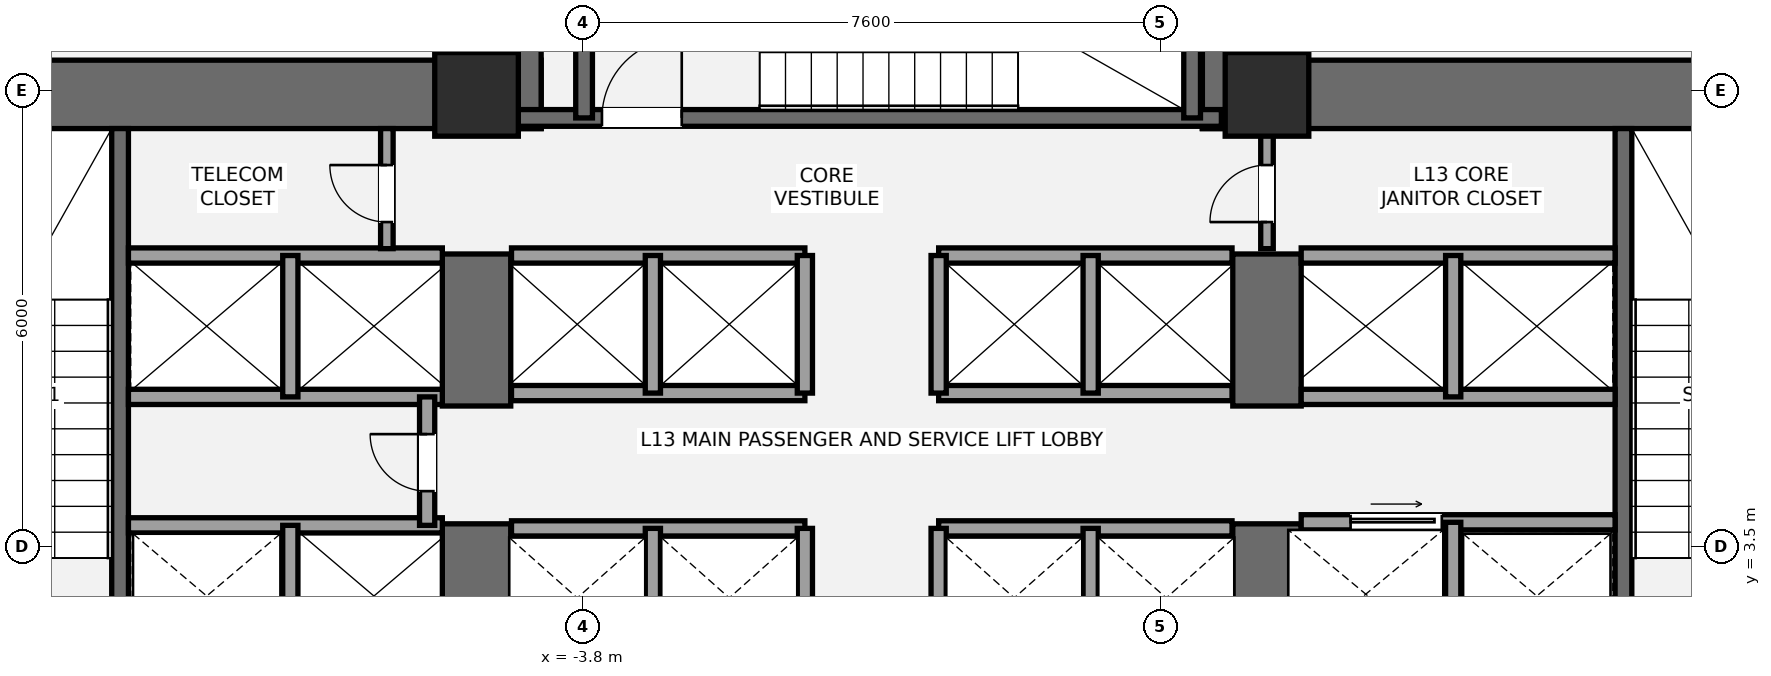
"""IFC4 building model, lengths in metres.
Left out: names, types, materials, properties, quantities, classifications, styles, units other than length and angle.
Written with IfcOpenShell. Run it as: python <this file> out.ifc"""

import sys

from ifc_helpers import new_model, si_unit, direction, frame, frame_2d, origin, origin_2d, place, context, subcontext, project, spatial, rectangle, extrude, element, fill, save


model = new_model("IFC4")
c1 = context("Model", 3, precision=1e-05, world=origin(), true_north=direction((0.0, 1.0)))
c2 = subcontext(c1, "Body", "Model", "MODEL_VIEW")
j1 = project(units=[si_unit("LENGTHUNIT", "METRE"), si_unit("PLANEANGLEUNIT", "RADIAN")], contexts=[c1])
p1 = place(None, origin())
s1 = spatial("IfcSite", under=j1, at=p1, CompositionType="ELEMENT")
p2 = place(p1, origin())
s2 = spatial("IfcBuilding", under=s1, at=p2, CompositionType="ELEMENT")
p3 = place(p2, frame((0.0, 0.0, 52.2)))
s3 = spatial("IfcBuildingStorey", under=s2, at=p3, CompositionType="ELEMENT", Elevation=52.2)
p4 = place(p3, frame((-14.05, 9.45, 0.0), z_axis=(0.0, 0.0, 1.0), x_axis=(1.0, 0.0, 0.0)))
e1 = element("IfcWall", 1, at=p4, inside=s3, PredefinedType="SHEAR", context=c2, shape_type="SweptSolid", body=[
    extrude(rectangle(XDim=9.7, YDim=0.9, at=frame_2d((4.85, 0.0))), origin(), (0.0, 0.0, 1.0), 3.6),
])
p5 = place(p3, frame((-5.2, 0.95, 0.0), z_axis=(0.0, 0.0, 1.0), x_axis=(0.0, 1.0, 0.0)))
e2 = element("IfcWall", 2, at=p5, inside=s3, PredefinedType="SHEAR", context=c2, shape_type="SweptSolid", body=[
    extrude(rectangle(XDim=2.85, YDim=0.9, at=frame_2d((1.425, 0.0))), origin(), (0.0, 0.0, 1.0), 3.6),
])
p6 = place(p3, frame((-5.2, 5.35, 0.0), z_axis=(0.0, 0.0, 1.0), x_axis=(0.0, 1.0, 0.0)))
e3 = element("IfcWall", 3, at=p6, inside=s3, PredefinedType="SHEAR", context=c2, shape_type="SweptSolid", body=[
    extrude(rectangle(XDim=2.0, YDim=0.9, at=frame_2d((1.0, 0.0))), origin(), (0.0, 0.0, 1.0), 3.6),
])
p7 = place(p3, frame((-9.89, 1.85, 0.0), z_axis=(0.0, 0.0, 1.0), x_axis=(0.0, 1.0, 0.0)))
e4 = element("IfcWall", 4, at=p7, inside=s3, PredefinedType="SHEAR", context=c2, shape_type="SweptSolid", body=[
    extrude(rectangle(XDim=7.15, YDim=0.22, at=frame_2d((3.575, 0.0))), origin(), (0.0, 0.0, 1.0), 3.6),
])
p8 = place(p3, frame((4.35, 9.45, 0.0), z_axis=(0.0, 0.0, 1.0), x_axis=(1.0, 0.0, 0.0)))
e5 = element("IfcWall", 5, at=p8, inside=s3, PredefinedType="SHEAR", context=c2, shape_type="SweptSolid", body=[
    extrude(rectangle(XDim=9.7, YDim=0.9, at=frame_2d((4.85, 0.0))), origin(), (0.0, 0.0, 1.0), 3.6),
])
p9 = place(p3, frame((5.2, 0.95, 0.0), z_axis=(0.0, 0.0, 1.0), x_axis=(0.0, 1.0, 0.0)))
e6 = element("IfcWall", 6, at=p9, inside=s3, PredefinedType="SHEAR", context=c2, shape_type="SweptSolid", body=[
    extrude(rectangle(XDim=2.85, YDim=0.9, at=frame_2d((1.425, 0.0))), origin(), (0.0, 0.0, 1.0), 3.6),
])
p10 = place(p3, frame((5.2, 5.35, 0.0), z_axis=(0.0, 0.0, 1.0), x_axis=(0.0, 1.0, 0.0)))
e7 = element("IfcWall", 7, at=p10, inside=s3, PredefinedType="SHEAR", context=c2, shape_type="SweptSolid", body=[
    extrude(rectangle(XDim=2.0, YDim=0.9, at=frame_2d((1.0, 0.0))), origin(), (0.0, 0.0, 1.0), 3.6),
])
p11 = place(p3, frame((9.89, 1.85, 0.0), z_axis=(0.0, 0.0, 1.0), x_axis=(0.0, 1.0, 0.0)))
e8 = element("IfcWall", 8, at=p11, inside=s3, PredefinedType="SHEAR", context=c2, shape_type="SweptSolid", body=[
    extrude(rectangle(XDim=7.15, YDim=0.22, at=frame_2d((3.575, 0.0))), origin(), (0.0, 0.0, 1.0), 3.6),
])
for number, where, z_axis, x_axis in (
    (9, (-4.8, 9.0, 0.0), (0.0, 0.0, 1.0), (0.0, 1.0, 0.0)),
    (10, (4.8, 9.0, 0.0), (0.0, 0.0, 1.0), (0.0, 1.0, 0.0)),
):
    element("IfcWall", number, at=place(p3, frame(where, z_axis=z_axis, x_axis=x_axis)), inside=s3, PredefinedType="SHEAR", context=c2, shape_type="SweptSolid", body=[
        extrude(rectangle(XDim=4.3, YDim=0.9, at=frame_2d((2.15, 0.0))), origin(), (0.0, 0.0, 1.0), 3.6),
    ])
p12 = place(p3, frame((-4.7, 9.14, 0.0), z_axis=(0.0, 0.0, 1.0), x_axis=(1.0, 0.0, 0.0)))
e11 = element("IfcWall", 11, at=p12, inside=s3, PredefinedType="SHEAR", context=c2, shape_type="SweptSolid", body=[
    extrude(rectangle(XDim=9.3, YDim=0.22, at=frame_2d((4.65, 0.0))), origin(), (0.0, 0.0, 1.0), 3.6),
])
p13 = place(p12, frame((1.15, 0.0, 0.0)))
e12 = element("IfcOpeningElement", 12, at=p13, cuts=e11, PredefinedType="OPENING", context=c2, shape_type="SweptSolid", body=[
    extrude(rectangle(XDim=1.05, YDim=2.15, at=frame_2d((0.525, 1.075))), frame((0.0, 0.12, 0.0), z_axis=(0.0, -1.0, 0.0), x_axis=(1.0, 0.0, 0.0)), (0.0, 0.0, 1.0), 0.24),
])
for number, where, z_axis, x_axis in (
    (13, (-3.785, 9.14, 0.0), (0.0, 0.0, 1.0), (0.0, 1.0, 0.0)),
    (14, (4.215, 9.14, 0.0), (0.0, 0.0, 1.0), (0.0, 1.0, 0.0)),
):
    element("IfcWall", number, at=place(p3, frame(where, z_axis=z_axis, x_axis=x_axis)), inside=s3, PredefinedType="SHEAR", context=c2, shape_type="SweptSolid", body=[
        extrude(rectangle(XDim=3.26, YDim=0.22, at=frame_2d((1.63, 0.0))), origin(), (0.0, 0.0, 1.0), 3.6),
    ])
for number, where, z_axis, x_axis in (
    (15, (-5.2, 9.45, 0.0), (0.0, 0.0, 1.0), (1.0, 0.0, 0.0)),
    (16, (5.2, 9.45, 0.0), (0.0, 0.0, 1.0), (1.0, 0.0, 0.0)),
):
    element("IfcColumn", number, at=place(p3, frame(where, z_axis=z_axis, x_axis=x_axis)), inside=s3, PredefinedType="COLUMN", context=c2, shape_type="SweptSolid", body=[
        extrude(rectangle(XDim=1.1, YDim=1.1, at=origin_2d()), origin(), (0.0, 0.0, 1.0), 3.6),
    ])
p14 = place(p3, frame((-9.78, 3.78, 0.0), z_axis=(0.0, 0.0, 1.0), x_axis=(1.0, 0.0, 0.0)))
e17 = element("IfcWall", 17, at=p14, inside=s3, PredefinedType="SOLIDWALL", context=c2, shape_type="SweptSolid", body=[
    extrude(rectangle(XDim=4.13, YDim=0.2, at=frame_2d((2.065, 0.0))), origin(), (0.0, 0.0, 1.0), 3.4),
])
p15 = place(p3, frame((-7.65, 1.85, 0.0), z_axis=(0.0, 0.0, 1.0), x_axis=(0.0, 1.0, 0.0)))
e18 = element("IfcWall", 18, at=p15, inside=s3, PredefinedType="SOLIDWALL", context=c2, shape_type="SweptSolid", body=[
    extrude(rectangle(XDim=1.93, YDim=0.2, at=frame_2d((0.965, 0.0))), origin(), (0.0, 0.0, 1.0), 3.4),
])
for number, where, z_axis, x_axis in (
    (19, (-9.78, 5.47, 0.0), (0.0, 0.0, 1.0), (1.0, 0.0, 0.0)),
    (20, (-9.78, 7.33, 0.0), (0.0, 0.0, 1.0), (1.0, 0.0, 0.0)),
):
    element("IfcWall", number, at=place(p3, frame(where, z_axis=z_axis, x_axis=x_axis)), inside=s3, PredefinedType="SOLIDWALL", context=c2, shape_type="SweptSolid", body=[
        extrude(rectangle(XDim=4.13, YDim=0.2, at=frame_2d((2.065, 0.0))), origin(), (0.0, 0.0, 1.0), 3.4),
    ])
p16 = place(p3, frame((-7.65, 5.47, 0.0), z_axis=(0.0, 0.0, 1.0), x_axis=(0.0, 1.0, 0.0)))
e21 = element("IfcWall", 21, at=p16, inside=s3, PredefinedType="SOLIDWALL", context=c2, shape_type="SweptSolid", body=[
    extrude(rectangle(XDim=1.86, YDim=0.2, at=frame_2d((0.93, 0.0))), origin(), (0.0, 0.0, 1.0), 3.4),
])
p17 = place(p3, frame((-5.85, 3.78, 0.0), z_axis=(0.0, 0.0, 1.0), x_axis=(0.0, 1.0, 0.0)))
e22 = element("IfcWall", 22, at=p17, inside=s3, PredefinedType="SOLIDWALL", context=c2, shape_type="SweptSolid", body=[
    extrude(rectangle(XDim=1.69, YDim=0.2, at=frame_2d((0.845, 0.0))), origin(), (0.0, 0.0, 1.0), 3.4),
])
p18 = place(p17, frame((0.45, 0.0, 0.0)))
e23 = element("IfcOpeningElement", 23, at=p18, cuts=e22, PredefinedType="OPENING", context=c2, shape_type="SweptSolid", body=[
    extrude(rectangle(XDim=0.75, YDim=2.1, at=frame_2d((0.375, 1.05))), frame((0.0, 0.11, 0.0), z_axis=(0.0, -1.0, 0.0), x_axis=(1.0, 0.0, 0.0)), (0.0, 0.0, 1.0), 0.22),
])
p19 = place(p3, frame((5.65, 3.82, 0.0), z_axis=(0.0, 0.0, 1.0), x_axis=(1.0, 0.0, 0.0)))
e24 = element("IfcWall", 24, at=p19, inside=s3, PredefinedType="SOLIDWALL", context=c2, shape_type="SweptSolid", body=[
    extrude(rectangle(XDim=4.13, YDim=0.2, at=frame_2d((2.065, 0.0))), origin(), (0.0, 0.0, 1.0), 3.4),
])
p20 = place(p19, frame((0.65, 0.0, 0.0)))
e25 = element("IfcOpeningElement", 25, at=p20, cuts=e24, PredefinedType="OPENING", context=c2, shape_type="SweptSolid", body=[
    extrude(rectangle(XDim=1.2, YDim=2.2, at=frame_2d((0.6, 1.1))), frame((0.0, 0.11, 0.0), z_axis=(0.0, -1.0, 0.0), x_axis=(1.0, 0.0, 0.0)), (0.0, 0.0, 1.0), 0.22),
])
p21 = place(p3, frame((7.65, 1.85, 0.0), z_axis=(0.0, 0.0, 1.0), x_axis=(0.0, 1.0, 0.0)))
e26 = element("IfcWall", 26, at=p21, inside=s3, PredefinedType="SOLIDWALL", context=c2, shape_type="SweptSolid", body=[
    extrude(rectangle(XDim=1.97, YDim=0.2, at=frame_2d((0.985, 0.0))), origin(), (0.0, 0.0, 1.0), 3.4),
])
for number, where, z_axis, x_axis in (
    (27, (5.65, 5.47, 0.0), (0.0, 0.0, 1.0), (1.0, 0.0, 0.0)),
    (28, (5.65, 7.33, 0.0), (0.0, 0.0, 1.0), (1.0, 0.0, 0.0)),
):
    element("IfcWall", number, at=place(p3, frame(where, z_axis=z_axis, x_axis=x_axis)), inside=s3, PredefinedType="SOLIDWALL", context=c2, shape_type="SweptSolid", body=[
        extrude(rectangle(XDim=4.13, YDim=0.2, at=frame_2d((2.065, 0.0))), origin(), (0.0, 0.0, 1.0), 3.4),
    ])
p22 = place(p3, frame((7.65, 5.47, 0.0), z_axis=(0.0, 0.0, 1.0), x_axis=(0.0, 1.0, 0.0)))
e29 = element("IfcWall", 29, at=p22, inside=s3, PredefinedType="SOLIDWALL", context=c2, shape_type="SweptSolid", body=[
    extrude(rectangle(XDim=1.86, YDim=0.2, at=frame_2d((0.93, 0.0))), origin(), (0.0, 0.0, 1.0), 3.4),
])
for number, where, z_axis, x_axis in (
    (30, (-4.74, 3.74, 0.0), (0.0, 0.0, 1.0), (1.0, 0.0, 0.0)),
    (31, (0.88, 3.74, 0.0), (0.0, 0.0, 1.0), (1.0, 0.0, 0.0)),
):
    element("IfcWall", number, at=place(p3, frame(where, z_axis=z_axis, x_axis=x_axis)), inside=s3, PredefinedType="SOLIDWALL", context=c2, shape_type="SweptSolid", body=[
        extrude(rectangle(XDim=3.86, YDim=0.2, at=frame_2d((1.93, 0.0))), origin(), (0.0, 0.0, 1.0), 3.4),
    ])
for number, where, z_axis, x_axis in (
    (32, (-2.88, 1.92, 0.0), (0.0, 0.0, 1.0), (0.0, 1.0, 0.0)),
    (33, (2.88, 1.92, 0.0), (0.0, 0.0, 1.0), (0.0, 1.0, 0.0)),
    (34, (-0.88, 1.92, 0.0), (0.0, 0.0, 1.0), (0.0, 1.0, 0.0)),
    (35, (0.88, 1.92, 0.0), (0.0, 0.0, 1.0), (0.0, 1.0, 0.0)),
):
    element("IfcWall", number, at=place(p3, frame(where, z_axis=z_axis, x_axis=x_axis)), inside=s3, PredefinedType="SOLIDWALL", context=c2, shape_type="SweptSolid", body=[
        extrude(rectangle(XDim=1.82, YDim=0.2, at=frame_2d((0.91, 0.0))), origin(), (0.0, 0.0, 1.0), 3.4),
    ])
for number, where, z_axis, x_axis in (
    (36, (-4.74, 5.52, 0.0), (0.0, 0.0, 1.0), (1.0, 0.0, 0.0)),
    (37, (0.88, 5.52, 0.0), (0.0, 0.0, 1.0), (1.0, 0.0, 0.0)),
    (38, (-4.74, 7.33, 0.0), (0.0, 0.0, 1.0), (1.0, 0.0, 0.0)),
    (39, (0.88, 7.33, 0.0), (0.0, 0.0, 1.0), (1.0, 0.0, 0.0)),
):
    element("IfcWall", number, at=place(p3, frame(where, z_axis=z_axis, x_axis=x_axis)), inside=s3, PredefinedType="SOLIDWALL", context=c2, shape_type="SweptSolid", body=[
        extrude(rectangle(XDim=3.86, YDim=0.2, at=frame_2d((1.93, 0.0))), origin(), (0.0, 0.0, 1.0), 3.4),
    ])
for number, where, z_axis, x_axis in (
    (40, (-2.88, 5.52, 0.0), (0.0, 0.0, 1.0), (0.0, 1.0, 0.0)),
    (41, (2.88, 5.52, 0.0), (0.0, 0.0, 1.0), (0.0, 1.0, 0.0)),
    (42, (-0.88, 5.52, 0.0), (0.0, 0.0, 1.0), (0.0, 1.0, 0.0)),
    (43, (0.88, 5.52, 0.0), (0.0, 0.0, 1.0), (0.0, 1.0, 0.0)),
):
    element("IfcWall", number, at=place(p3, frame(where, z_axis=z_axis, x_axis=x_axis)), inside=s3, PredefinedType="SOLIDWALL", context=c2, shape_type="SweptSolid", body=[
        extrude(rectangle(XDim=1.81, YDim=0.2, at=frame_2d((0.905, 0.0))), origin(), (0.0, 0.0, 1.0), 3.4),
    ])
p23 = place(p3, frame((-6.38, 7.42, 0.0), z_axis=(0.0, 0.0, 1.0), x_axis=(0.0, 1.0, 0.0)))
e44 = element("IfcWall", 44, at=p23, inside=s3, PredefinedType="PARTITIONING", context=c2, shape_type="SweptSolid", body=[
    extrude(rectangle(XDim=1.58, YDim=0.165, at=frame_2d((0.79, 0.0))), origin(), (0.0, 0.0, 1.0), 3.4),
])
p24 = place(p23, frame((0.35, 0.0, 0.0)))
e45 = element("IfcOpeningElement", 45, at=p24, cuts=e44, PredefinedType="OPENING", context=c2, shape_type="SweptSolid", body=[
    extrude(rectangle(XDim=0.75, YDim=2.1, at=frame_2d((0.375, 1.05))), frame((0.0, 0.093, 0.0), z_axis=(0.0, -1.0, 0.0), x_axis=(1.0, 0.0, 0.0)), (0.0, 0.0, 1.0), 0.185),
])
p25 = place(p3, frame((5.2, 7.42, 0.0), z_axis=(0.0, 0.0, 1.0), x_axis=(0.0, 1.0, 0.0)))
e46 = element("IfcWall", 46, at=p25, inside=s3, PredefinedType="PARTITIONING", context=c2, shape_type="SweptSolid", body=[
    extrude(rectangle(XDim=1.58, YDim=0.165, at=frame_2d((0.79, 0.0))), origin(), (0.0, 0.0, 1.0), 3.4),
])
p26 = place(p25, frame((0.35, 0.0, 0.0)))
e47 = element("IfcOpeningElement", 47, at=p26, cuts=e46, PredefinedType="OPENING", context=c2, shape_type="SweptSolid", body=[
    extrude(rectangle(XDim=0.75, YDim=2.1, at=frame_2d((0.375, 1.05))), frame((0.0, 0.093, 0.0), z_axis=(0.0, -1.0, 0.0), x_axis=(1.0, 0.0, 0.0)), (0.0, 0.0, 1.0), 0.185),
])
p27 = place(p13, origin())
e48 = element("IfcDoor", 48, at=p27, inside=s3, OperationType="SINGLE_SWING_RIGHT", PredefinedType="DOOR", context=c2, shape_type="SweptSolid", body=[
    extrude(rectangle(XDim=1.05, YDim=2.15, at=frame_2d((0.525, 1.075))), frame((0.0, 0.025, 0.0), z_axis=(0.0, -1.0, 0.0), x_axis=(1.0, 0.0, 0.0)), (0.0, 0.0, 1.0), 0.05),
])
fill(e12, e48)
p28 = place(p18, origin())
e49 = element("IfcDoor", 49, at=p28, inside=s3, OperationType="SINGLE_SWING_RIGHT", PredefinedType="DOOR", context=c2, shape_type="SweptSolid", body=[
    extrude(rectangle(XDim=0.75, YDim=2.1, at=frame_2d((0.375, 1.05))), frame((0.0, 0.025, 0.0), z_axis=(0.0, -1.0, 0.0), x_axis=(1.0, 0.0, 0.0)), (0.0, 0.0, 1.0), 0.05),
])
fill(e23, e49)
p29 = place(p20, origin())
e50 = element("IfcDoor", 50, at=p29, inside=s3, OperationType="SLIDING_TO_RIGHT", PredefinedType="DOOR", context=c2, shape_type="SweptSolid", body=[
    extrude(rectangle(XDim=1.2, YDim=2.2, at=frame_2d((0.6, 1.1))), frame((0.0, 0.025, 0.0), z_axis=(0.0, -1.0, 0.0), x_axis=(1.0, 0.0, 0.0)), (0.0, 0.0, 1.0), 0.05),
])
fill(e25, e50)
p30 = place(p24, origin())
e51 = element("IfcDoor", 51, at=p30, inside=s3, OperationType="SINGLE_SWING_RIGHT", PredefinedType="DOOR", context=c2, shape_type="SweptSolid", body=[
    extrude(rectangle(XDim=0.75, YDim=2.1, at=frame_2d((0.375, 1.05))), frame((0.0, 0.025, 0.0), z_axis=(0.0, -1.0, 0.0), x_axis=(1.0, 0.0, 0.0)), (0.0, 0.0, 1.0), 0.05),
])
fill(e45, e51)
p31 = place(p26, origin())
e52 = element("IfcDoor", 52, at=p31, inside=s3, OperationType="SINGLE_SWING_LEFT", PredefinedType="DOOR", context=c2, shape_type="SweptSolid", body=[
    extrude(rectangle(XDim=0.75, YDim=2.1, at=frame_2d((0.375, 1.05))), frame((0.0, 0.025, 0.0), z_axis=(0.0, -1.0, 0.0), x_axis=(1.0, 0.0, 0.0)), (0.0, 0.0, 1.0), 0.05),
])
fill(e47, e52)
save(model, sys.argv[1])
